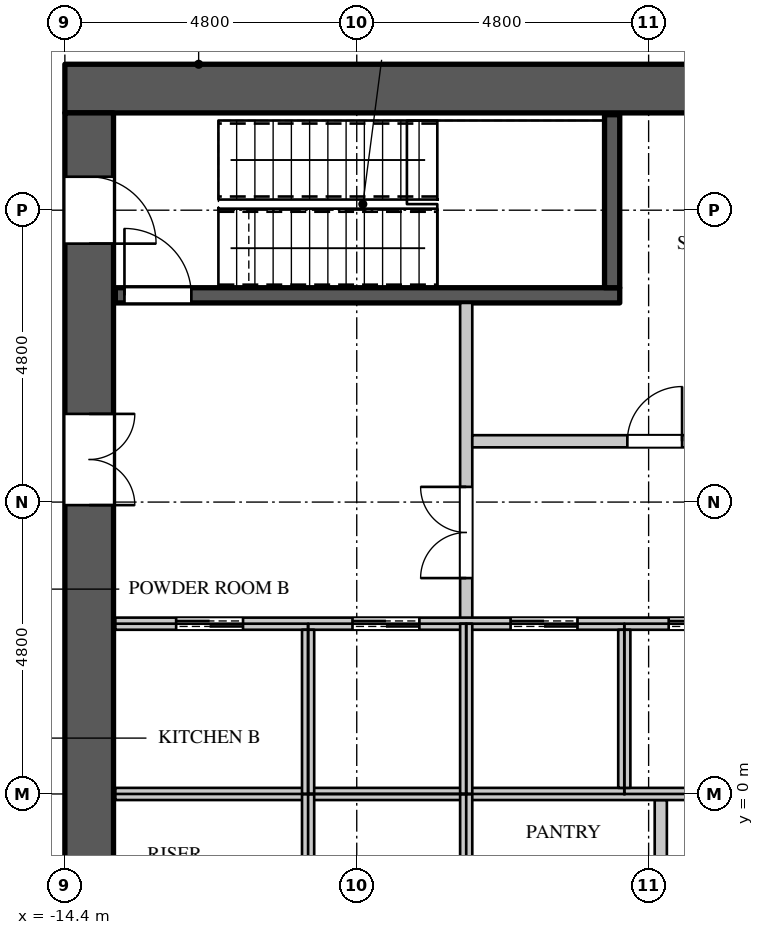
"""IFC4 building model, lengths in metres.
Left out: names, types, materials, properties, quantities, classifications, styles, units other than length and angle.
Written with IfcOpenShell. Run it as: python <this file> out.ifc"""

import sys

from ifc_helpers import new_model, si_unit, direction, frame, frame_2d, origin, place, context, subcontext, project, spatial, rectangle, extrude, element, fill, save


model = new_model("IFC4")
c1 = context("Model", 3, precision=1e-05, world=origin(), true_north=direction((0.0, 1.0)))
c2 = subcontext(c1, "Body", "Model", "MODEL_VIEW")
j1 = project(units=[si_unit("LENGTHUNIT", "METRE"), si_unit("PLANEANGLEUNIT", "RADIAN")], contexts=[c1])
p1 = place(None, origin())
s1 = spatial("IfcSite", under=j1, at=p1, CompositionType="ELEMENT")
p2 = place(p1, origin())
s2 = spatial("IfcBuilding", under=s1, at=p2, CompositionType="ELEMENT")
p3 = place(p2, frame((0.0, 0.0, 110.7)))
s3 = spatial("IfcBuildingStorey", under=s2, at=p3, CompositionType="ELEMENT", Elevation=110.7)
p4 = place(p3, frame((-14.4, 11.6, 0.0), z_axis=(0.0, 0.0, 1.0), x_axis=(1.0, 0.0, 0.0)))
e1 = element("IfcWall", 1, at=p4, inside=s3, PredefinedType="SHEAR", context=c2, shape_type="SweptSolid", body=[
    extrude(rectangle(XDim=28.8, YDim=0.8, at=frame_2d((14.4, 0.0))), origin(), (0.0, 0.0, 1.0), 4.2),
])
p5 = place(p3, frame((-14.0, -11.2, 0.0), z_axis=(0.0, 0.0, 1.0), x_axis=(0.0, 1.0, 0.0)))
e2 = element("IfcWall", 2, at=p5, inside=s3, PredefinedType="SHEAR", context=c2, shape_type="SweptSolid", body=[
    extrude(rectangle(XDim=22.4, YDim=0.8, at=frame_2d((11.2, 0.0))), origin(), (0.0, 0.0, 1.0), 4.2),
])
p6 = place(p5, frame((20.25, 0.0, 0.0)))
e3 = element("IfcOpeningElement", 3, at=p6, cuts=e2, PredefinedType="OPENING", context=c2, shape_type="SweptSolid", body=[
    extrude(rectangle(XDim=1.1, YDim=2.2, at=frame_2d((0.55, 1.1))), frame((0.0, 0.41, 0.0), z_axis=(0.0, -1.0, 0.0), x_axis=(1.0, 0.0, 0.0)), (0.0, 0.0, 1.0), 0.82),
])
p7 = place(p5, frame((1.05, 0.0, 0.0)))
e4 = element("IfcOpeningElement", 4, at=p7, cuts=e2, PredefinedType="OPENING", context=c2, shape_type="SweptSolid", body=[
    extrude(rectangle(XDim=1.1, YDim=2.2, at=frame_2d((0.55, 1.1))), frame((0.0, 0.41, 0.0), z_axis=(0.0, -1.0, 0.0), x_axis=(1.0, 0.0, 0.0)), (0.0, 0.0, 1.0), 0.82),
])
p8 = place(p5, frame((15.95, 0.0, 0.0)))
e5 = element("IfcOpeningElement", 5, at=p8, cuts=e2, PredefinedType="OPENING", context=c2, shape_type="SweptSolid", body=[
    extrude(rectangle(XDim=1.5, YDim=2.4, at=frame_2d((0.75, 1.2))), frame((0.0, 0.41, 0.0), z_axis=(0.0, -1.0, 0.0), x_axis=(1.0, 0.0, 0.0)), (0.0, 0.0, 1.0), 0.82),
])
p9 = place(p5, frame((4.95, 0.0, 0.0)))
e6 = element("IfcOpeningElement", 6, at=p9, cuts=e2, PredefinedType="OPENING", context=c2, shape_type="SweptSolid", body=[
    extrude(rectangle(XDim=1.5, YDim=2.4, at=frame_2d((0.75, 1.2))), frame((0.0, 0.41, 0.0), z_axis=(0.0, -1.0, 0.0), x_axis=(1.0, 0.0, 0.0)), (0.0, 0.0, 1.0), 0.82),
])
p10 = place(p3, frame((-7.8, 2.8, 0.0), z_axis=(0.0, 0.0, 1.0), x_axis=(0.0, 1.0, 0.0)))
e7 = element("IfcWall", 7, at=p10, inside=s3, PredefinedType="PARTITIONING", context=c2, shape_type="SweptSolid", body=[
    extrude(rectangle(XDim=5.275, YDim=0.2, at=frame_2d((2.637, 0.0))), origin(), (0.0, 0.0, 1.0), 3.95),
])
p11 = place(p10, frame((0.75, 0.0, 0.0)))
e8 = element("IfcOpeningElement", 8, at=p11, cuts=e7, PredefinedType="OPENING", context=c2, shape_type="SweptSolid", body=[
    extrude(rectangle(XDim=1.5, YDim=2.4, at=frame_2d((0.75, 1.2))), frame((0.0, 0.11, 0.0), z_axis=(0.0, -1.0, 0.0), x_axis=(1.0, 0.0, 0.0)), (0.0, 0.0, 1.0), 0.22),
])
p12 = place(p3, frame((-7.7, 5.8, 0.0), z_axis=(0.0, 0.0, 1.0), x_axis=(1.0, 0.0, 0.0)))
e9 = element("IfcWall", 9, at=p12, inside=s3, PredefinedType="PARTITIONING", context=c2, shape_type="SweptSolid", body=[
    extrude(rectangle(XDim=9.92, YDim=0.2, at=frame_2d((4.96, 0.0))), origin(), (0.0, 0.0, 1.0), 3.95),
])
p13 = place(p12, frame((2.55, 0.0, 0.0)))
e10 = element("IfcOpeningElement", 10, at=p13, cuts=e9, PredefinedType="OPENING", context=c2, shape_type="SweptSolid", body=[
    extrude(rectangle(XDim=0.9, YDim=2.2, at=frame_2d((0.45, 1.1))), frame((0.0, 0.11, 0.0), z_axis=(0.0, -1.0, 0.0), x_axis=(1.0, 0.0, 0.0)), (0.0, 0.0, 1.0), 0.22),
])
p14 = place(p12, frame((7.4, 0.0, 0.0)))
e11 = element("IfcOpeningElement", 11, at=p14, cuts=e9, PredefinedType="OPENING", context=c2, shape_type="SweptSolid", body=[
    extrude(rectangle(XDim=0.9, YDim=2.2, at=frame_2d((0.45, 1.1))), frame((0.0, 0.11, 0.0), z_axis=(0.0, -1.0, 0.0), x_axis=(1.0, 0.0, 0.0)), (0.0, 0.0, 1.0), 0.22),
])
p15 = place(p3, frame((-4.6, -2.7, 0.0), z_axis=(0.0, 0.0, 1.0), x_axis=(0.0, 1.0, 0.0)))
e12 = element("IfcWall", 12, at=p15, inside=s3, PredefinedType="PARTITIONING", context=c2, shape_type="SweptSolid", body=[
    extrude(rectangle(XDim=2.6, YDim=0.2, at=frame_2d((1.3, 0.0))), origin(), (0.0, 0.0, 1.0), 3.95),
])
p16 = place(p3, frame((-13.57, 0.0, 0.0), z_axis=(0.0, 0.0, 1.0), x_axis=(1.0, 0.0, 0.0)))
e13 = element("IfcWall", 13, at=p16, inside=s3, PredefinedType="PARTITIONING", context=c2, shape_type="SweptSolid", body=[
    extrude(rectangle(XDim=23.97, YDim=0.2, at=frame_2d((11.985, 0.0))), origin(), (0.0, 0.0, 1.0), 3.95),
])
p17 = place(p3, frame((-13.57, 2.8, 0.0), z_axis=(0.0, 0.0, 1.0), x_axis=(1.0, 0.0, 0.0)))
e14 = element("IfcWall", 14, at=p17, inside=s3, PredefinedType="PARTITIONING", context=c2, shape_type="SweptSolid", body=[
    extrude(rectangle(XDim=23.97, YDim=0.2, at=frame_2d((11.985, 0.0))), origin(), (0.0, 0.0, 1.0), 3.95),
])
p18 = place(p17, frame((1.0, 0.0, 0.0)))
e15 = element("IfcOpeningElement", 15, at=p18, cuts=e14, PredefinedType="OPENING", context=c2, shape_type="SweptSolid", body=[
    extrude(rectangle(XDim=1.1, YDim=2.2, at=frame_2d((0.55, 1.1))), frame((0.0, 0.11, 0.0), z_axis=(0.0, -1.0, 0.0), x_axis=(1.0, 0.0, 0.0)), (0.0, 0.0, 1.0), 0.22),
])
p19 = place(p17, frame((3.9, 0.0, 0.0)))
e16 = element("IfcOpeningElement", 16, at=p19, cuts=e14, PredefinedType="OPENING", context=c2, shape_type="SweptSolid", body=[
    extrude(rectangle(XDim=1.1, YDim=2.2, at=frame_2d((0.55, 1.1))), frame((0.0, 0.11, 0.0), z_axis=(0.0, -1.0, 0.0), x_axis=(1.0, 0.0, 0.0)), (0.0, 0.0, 1.0), 0.22),
])
p20 = place(p17, frame((6.5, 0.0, 0.0)))
e17 = element("IfcOpeningElement", 17, at=p20, cuts=e14, PredefinedType="OPENING", context=c2, shape_type="SweptSolid", body=[
    extrude(rectangle(XDim=1.1, YDim=2.2, at=frame_2d((0.55, 1.1))), frame((0.0, 0.11, 0.0), z_axis=(0.0, -1.0, 0.0), x_axis=(1.0, 0.0, 0.0)), (0.0, 0.0, 1.0), 0.22),
])
p21 = place(p17, frame((9.1, 0.0, 0.0)))
e18 = element("IfcOpeningElement", 18, at=p21, cuts=e14, PredefinedType="OPENING", context=c2, shape_type="SweptSolid", body=[
    extrude(rectangle(XDim=1.1, YDim=2.2, at=frame_2d((0.55, 1.1))), frame((0.0, 0.11, 0.0), z_axis=(0.0, -1.0, 0.0), x_axis=(1.0, 0.0, 0.0)), (0.0, 0.0, 1.0), 0.22),
])
p22 = place(p17, frame((11.7, 0.0, 0.0)))
e19 = element("IfcOpeningElement", 19, at=p22, cuts=e14, PredefinedType="OPENING", context=c2, shape_type="SweptSolid", body=[
    extrude(rectangle(XDim=1.1, YDim=2.2, at=frame_2d((0.55, 1.1))), frame((0.0, 0.11, 0.0), z_axis=(0.0, -1.0, 0.0), x_axis=(1.0, 0.0, 0.0)), (0.0, 0.0, 1.0), 0.22),
])
p23 = place(p17, frame((14.3, 0.0, 0.0)))
e20 = element("IfcOpeningElement", 20, at=p23, cuts=e14, PredefinedType="OPENING", context=c2, shape_type="SweptSolid", body=[
    extrude(rectangle(XDim=1.1, YDim=2.2, at=frame_2d((0.55, 1.1))), frame((0.0, 0.11, 0.0), z_axis=(0.0, -1.0, 0.0), x_axis=(1.0, 0.0, 0.0)), (0.0, 0.0, 1.0), 0.22),
])
p24 = place(p17, frame((16.9, 0.0, 0.0)))
e21 = element("IfcOpeningElement", 21, at=p24, cuts=e14, PredefinedType="OPENING", context=c2, shape_type="SweptSolid", body=[
    extrude(rectangle(XDim=1.1, YDim=2.2, at=frame_2d((0.55, 1.1))), frame((0.0, 0.11, 0.0), z_axis=(0.0, -1.0, 0.0), x_axis=(1.0, 0.0, 0.0)), (0.0, 0.0, 1.0), 0.22),
])
p25 = place(p17, frame((19.5, 0.0, 0.0)))
e22 = element("IfcOpeningElement", 22, at=p25, cuts=e14, PredefinedType="OPENING", context=c2, shape_type="SweptSolid", body=[
    extrude(rectangle(XDim=1.1, YDim=2.2, at=frame_2d((0.55, 1.1))), frame((0.0, 0.11, 0.0), z_axis=(0.0, -1.0, 0.0), x_axis=(1.0, 0.0, 0.0)), (0.0, 0.0, 1.0), 0.22),
])
for number, where, z_axis, x_axis in (
    (23, (-10.4, -2.7, 0.0), (0.0, 0.0, 1.0), (0.0, 1.0, 0.0)),
    (24, (-10.4, 0.0, 0.0), (0.0, 0.0, 1.0), (0.0, 1.0, 0.0)),
):
    element("IfcWall", number, at=place(p3, frame(where, z_axis=z_axis, x_axis=x_axis)), inside=s3, PredefinedType="PARTITIONING", context=c2, shape_type="SweptSolid", body=[
        extrude(rectangle(XDim=2.7, YDim=0.2, at=frame_2d((1.35, 0.0))), origin(), (0.0, 0.0, 1.0), 3.95),
    ])
for number, where, z_axis, x_axis in (
    (25, (-7.8, -2.8, 0.0), (0.0, 0.0, 1.0), (0.0, 1.0, 0.0)),
    (26, (-7.8, 0.0, 0.0), (0.0, 0.0, 1.0), (0.0, 1.0, 0.0)),
):
    element("IfcWall", number, at=place(p3, frame(where, z_axis=z_axis, x_axis=x_axis)), inside=s3, PredefinedType="PARTITIONING", context=c2, shape_type="SweptSolid", body=[
        extrude(rectangle(XDim=2.8, YDim=0.2, at=frame_2d((1.4, 0.0))), origin(), (0.0, 0.0, 1.0), 3.95),
    ])
p26 = place(p3, frame((-5.2, 0.1, 0.0), z_axis=(0.0, 0.0, 1.0), x_axis=(0.0, 1.0, 0.0)))
e27 = element("IfcWall", 27, at=p26, inside=s3, PredefinedType="PARTITIONING", context=c2, shape_type="SweptSolid", body=[
    extrude(rectangle(XDim=2.6, YDim=0.2, at=frame_2d((1.3, 0.0))), origin(), (0.0, 0.0, 1.0), 3.95),
])
p27 = place(p3, frame((-13.57, 8.2, 0.0), z_axis=(0.0, 0.0, 1.0), x_axis=(1.0, 0.0, 0.0)))
e28 = element("IfcWall", 28, at=p27, inside=s3, PredefinedType="SHEAR", context=c2, shape_type="SweptSolid", body=[
    extrude(rectangle(XDim=8.295, YDim=0.25, at=frame_2d((4.147, 0.0))), origin(), (0.0, 0.0, 1.0), 3.95),
])
p28 = place(p27, frame((0.15, 0.0, 0.0)))
e29 = element("IfcOpeningElement", 29, at=p28, cuts=e28, PredefinedType="OPENING", context=c2, shape_type="SweptSolid", body=[
    extrude(rectangle(XDim=1.1, YDim=2.2, at=frame_2d((0.55, 1.1))), frame((0.0, 0.135, 0.0), z_axis=(0.0, -1.0, 0.0), x_axis=(1.0, 0.0, 0.0)), (0.0, 0.0, 1.0), 0.27),
])
p29 = place(p3, frame((-5.4, 8.325, 0.0), z_axis=(0.0, 0.0, 1.0), x_axis=(0.0, 1.0, 0.0)))
e30 = element("IfcWall", 30, at=p29, inside=s3, PredefinedType="SHEAR", context=c2, shape_type="SweptSolid", body=[
    extrude(rectangle(XDim=2.845, YDim=0.25, at=frame_2d((1.422, 0.0))), origin(), (0.0, 0.0, 1.0), 3.95),
])
p30 = place(p13, origin())
e31 = element("IfcDoor", 31, at=p30, inside=s3, OperationType="SINGLE_SWING_RIGHT", PredefinedType="DOOR", context=c2, shape_type="SweptSolid", body=[
    extrude(rectangle(XDim=0.9, YDim=2.2, at=frame_2d((0.45, 1.1))), frame((0.0, 0.025, 0.0), z_axis=(0.0, -1.0, 0.0), x_axis=(1.0, 0.0, 0.0)), (0.0, 0.0, 1.0), 0.05),
])
fill(e10, e31)
p31 = place(p18, origin())
e32 = element("IfcDoor", 32, at=p31, inside=s3, OperationType="DOUBLE_DOOR_SLIDING", PredefinedType="DOOR", context=c2, shape_type="SweptSolid", body=[
    extrude(rectangle(XDim=1.1, YDim=2.2, at=frame_2d((0.55, 1.1))), frame((0.0, 0.025, 0.0), z_axis=(0.0, -1.0, 0.0), x_axis=(1.0, 0.0, 0.0)), (0.0, 0.0, 1.0), 0.05),
])
fill(e15, e32)
p32 = place(p19, origin())
e33 = element("IfcDoor", 33, at=p32, inside=s3, OperationType="DOUBLE_DOOR_SLIDING", PredefinedType="DOOR", context=c2, shape_type="SweptSolid", body=[
    extrude(rectangle(XDim=1.1, YDim=2.2, at=frame_2d((0.55, 1.1))), frame((0.0, 0.025, 0.0), z_axis=(0.0, -1.0, 0.0), x_axis=(1.0, 0.0, 0.0)), (0.0, 0.0, 1.0), 0.05),
])
fill(e16, e33)
p33 = place(p20, origin())
e34 = element("IfcDoor", 34, at=p33, inside=s3, OperationType="DOUBLE_DOOR_SLIDING", PredefinedType="DOOR", context=c2, shape_type="SweptSolid", body=[
    extrude(rectangle(XDim=1.1, YDim=2.2, at=frame_2d((0.55, 1.1))), frame((0.0, 0.025, 0.0), z_axis=(0.0, -1.0, 0.0), x_axis=(1.0, 0.0, 0.0)), (0.0, 0.0, 1.0), 0.05),
])
fill(e17, e34)
p34 = place(p21, origin())
e35 = element("IfcDoor", 35, at=p34, inside=s3, OperationType="DOUBLE_DOOR_SLIDING", PredefinedType="DOOR", context=c2, shape_type="SweptSolid", body=[
    extrude(rectangle(XDim=1.1, YDim=2.2, at=frame_2d((0.55, 1.1))), frame((0.0, 0.025, 0.0), z_axis=(0.0, -1.0, 0.0), x_axis=(1.0, 0.0, 0.0)), (0.0, 0.0, 1.0), 0.05),
])
fill(e18, e35)
p35 = place(p28, origin())
e36 = element("IfcDoor", 36, at=p35, inside=s3, OperationType="SINGLE_SWING_LEFT", PredefinedType="DOOR", context=c2, shape_type="SweptSolid", body=[
    extrude(rectangle(XDim=1.1, YDim=2.2, at=frame_2d((0.55, 1.1))), frame((0.0, 0.025, 0.0), z_axis=(0.0, -1.0, 0.0), x_axis=(1.0, 0.0, 0.0)), (0.0, 0.0, 1.0), 0.05),
])
fill(e29, e36)
p36 = place(p11, origin())
e37 = element("IfcDoor", 37, at=p36, inside=s3, OperationType="DOUBLE_DOOR_SINGLE_SWING", PredefinedType="DOOR", context=c2, shape_type="SweptSolid", body=[
    extrude(rectangle(XDim=1.5, YDim=2.4, at=frame_2d((0.75, 1.2))), frame((0.0, 0.025, 0.0), z_axis=(0.0, -1.0, 0.0), x_axis=(1.0, 0.0, 0.0)), (0.0, 0.0, 1.0), 0.05),
])
fill(e8, e37)
p37 = place(p6, origin())
e38 = element("IfcDoor", 38, at=p37, inside=s3, OperationType="SINGLE_SWING_RIGHT", PredefinedType="DOOR", context=c2, shape_type="SweptSolid", body=[
    extrude(rectangle(XDim=1.1, YDim=2.2, at=frame_2d((0.55, 1.1))), frame((0.0, -0.345, 0.0), z_axis=(0.0, -1.0, 0.0), x_axis=(1.0, 0.0, 0.0)), (0.0, 0.0, 1.0), 0.05),
])
fill(e3, e38)
p38 = place(p8, origin())
e39 = element("IfcDoor", 39, at=p38, inside=s3, OperationType="DOUBLE_DOOR_SINGLE_SWING", PredefinedType="DOOR", context=c2, shape_type="SweptSolid", body=[
    extrude(rectangle(XDim=1.5, YDim=2.4, at=frame_2d((0.75, 1.2))), frame((0.0, -0.345, 0.0), z_axis=(0.0, -1.0, 0.0), x_axis=(1.0, 0.0, 0.0)), (0.0, 0.0, 1.0), 0.05),
])
fill(e5, e39)
save(model, sys.argv[1])
